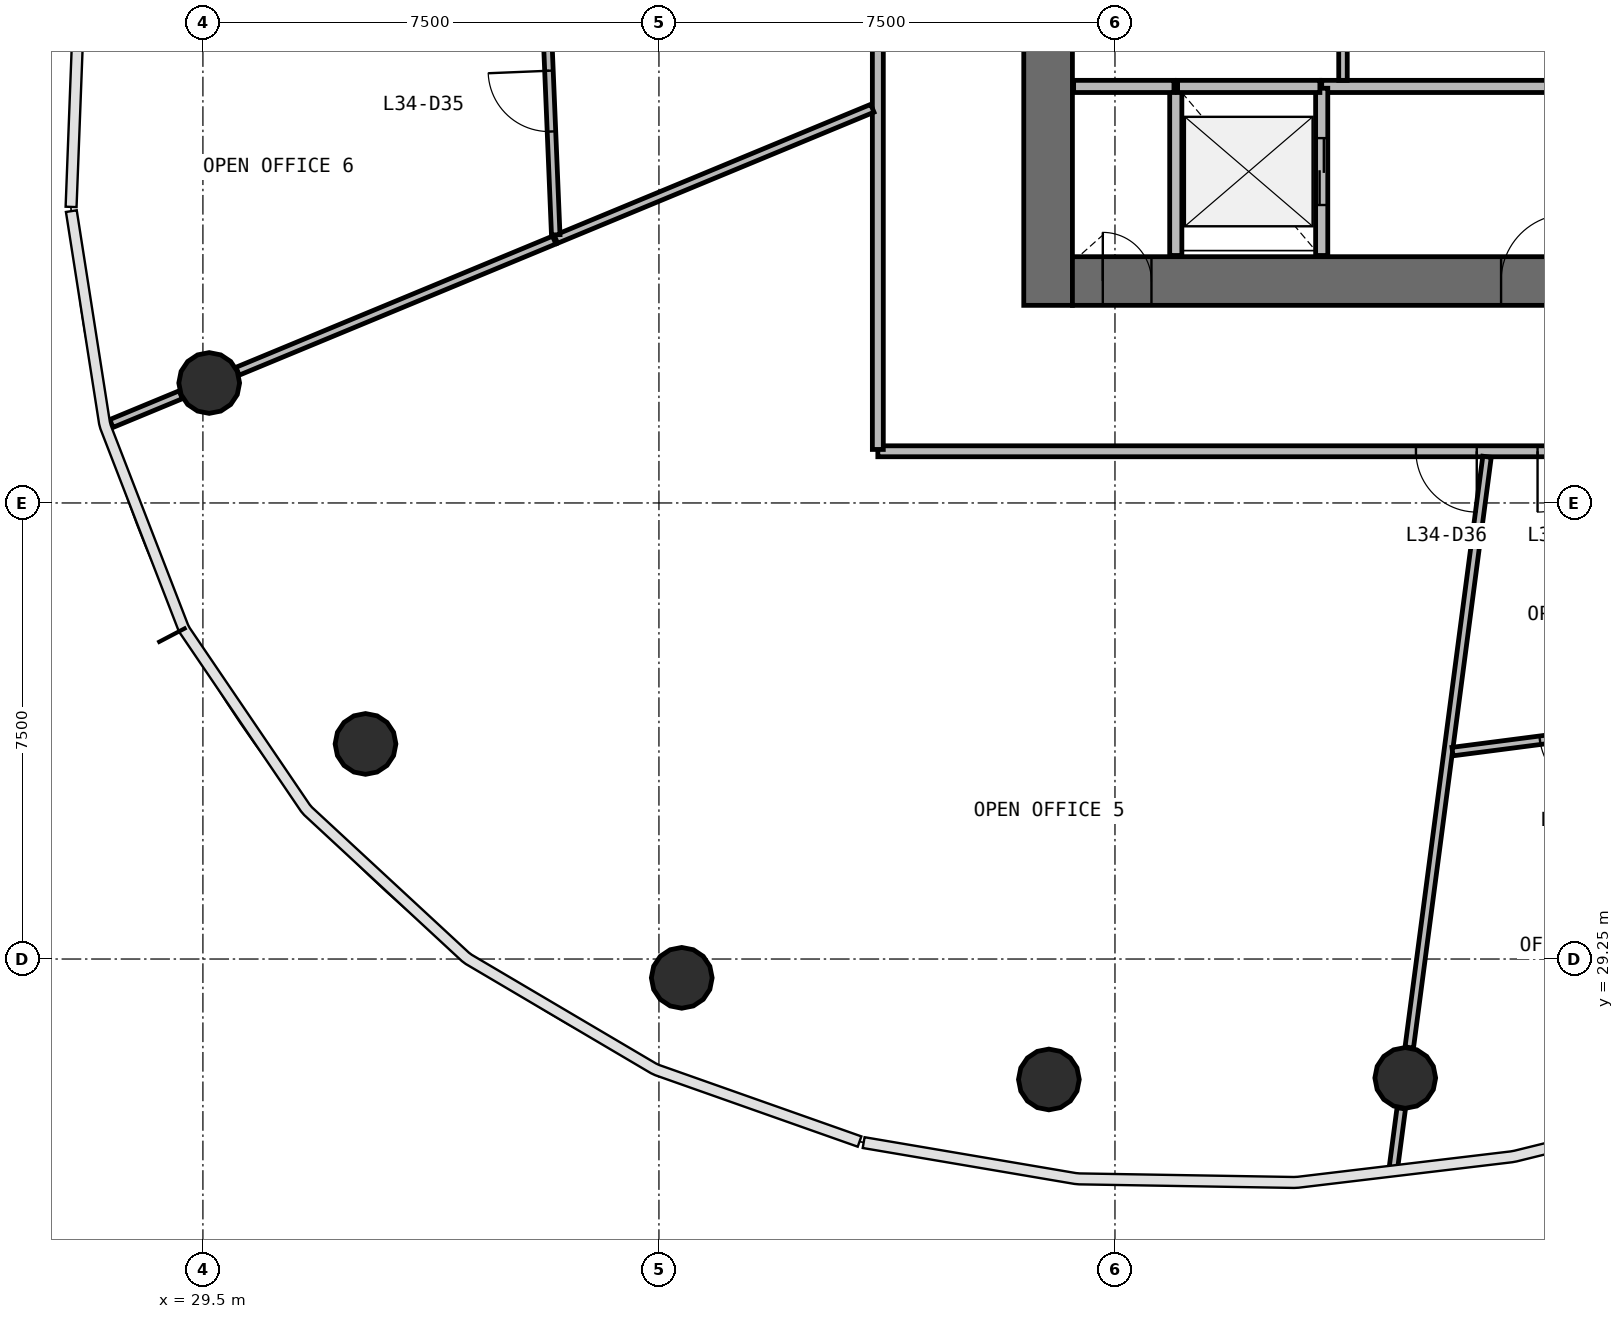
"""IFC4 building model, lengths in metres.
Left out: names, types, materials, properties, quantities, classifications, styles, units other than length and angle.
Written with IfcOpenShell. Run it as: python <this file> out.ifc"""

import sys

from ifc_helpers import new_model, si_unit, direction, frame, frame_2d, origin, origin_2d, place, context, subcontext, project, spatial, rectangle, circle, extrude, source, transform, mapped, element, fill, save


model = new_model("IFC4")
c1 = context("Model", 3, precision=1e-05, world=origin(), true_north=direction((0.0, 1.0)))
c2 = subcontext(c1, "Body", "Model", "MODEL_VIEW")
j1 = project(units=[si_unit("LENGTHUNIT", "METRE"), si_unit("PLANEANGLEUNIT", "RADIAN")], contexts=[c1])
p1 = place(None, origin())
s1 = spatial("IfcSite", under=j1, at=p1, CompositionType="ELEMENT")
p2 = place(p1, origin())
s2 = spatial("IfcBuilding", under=s1, at=p2, CompositionType="ELEMENT")
p3 = place(p2, frame((0.0, 0.0, 144.8)))
s3 = spatial("IfcBuildingStorey", under=s2, at=p3, CompositionType="ELEMENT", Elevation=144.8)
p4 = place(p3, frame((43.4, 56.0, 0.0), z_axis=(0.0, 0.0, 1.0), x_axis=(0.0, -1.0, 0.0)))
e1 = element("IfcWall", 1, at=p4, inside=s3, PredefinedType="SHEAR", context=c2, shape_type="SweptSolid", body=[
    extrude(rectangle(XDim=16.0, YDim=0.8, at=frame_2d((8.0, 0.0))), origin(), (0.0, 0.0, 1.0), 3.9),
])
p5 = place(p4, frame((7.1, 0.0, 0.0)))
e2 = element("IfcOpeningElement", 2, at=p5, cuts=e1, PredefinedType="OPENING", context=c2, shape_type="SweptSolid", body=[
    extrude(rectangle(XDim=1.8, YDim=2.1, at=frame_2d((0.9, 1.05))), frame((0.0, 0.41, 0.0), z_axis=(0.0, -1.0, 0.0), x_axis=(1.0, 0.0, 0.0)), (0.0, 0.0, 1.0), 0.82),
])
p6 = place(p3, frame((43.8, 40.4, 0.0), z_axis=(0.0, 0.0, 1.0), x_axis=(1.0, 0.0, 0.0)))
e3 = element("IfcWall", 3, at=p6, inside=s3, PredefinedType="SHEAR", context=c2, shape_type="SweptSolid", body=[
    extrude(rectangle(XDim=16.4, YDim=0.8, at=frame_2d((8.2, 0.0))), origin(), (0.0, 0.0, 1.0), 3.9),
])
p7 = place(p6, frame((10.1, 0.0, 0.0)))
e4 = element("IfcOpeningElement", 4, at=p7, cuts=e3, PredefinedType="OPENING", context=c2, shape_type="SweptSolid", body=[
    extrude(rectangle(XDim=1.2, YDim=2.1, at=frame_2d((0.6, 1.05))), frame((0.0, 0.41, 0.0), z_axis=(0.0, -1.0, 0.0), x_axis=(1.0, 0.0, 0.0)), (0.0, 0.0, 1.0), 0.82),
])
p8 = place(p6, frame((7.05, 0.0, 0.0)))
e5 = element("IfcOpeningElement", 5, at=p8, cuts=e3, PredefinedType="OPENING", context=c2, shape_type="SweptSolid", body=[
    extrude(rectangle(XDim=1.1, YDim=2.1, at=frame_2d((0.55, 1.05))), frame((0.0, 0.41, 0.0), z_axis=(0.0, -1.0, 0.0), x_axis=(1.0, 0.0, 0.0)), (0.0, 0.0, 1.0), 0.82),
])
p9 = place(p6, frame((0.5, 0.0, 0.0)))
e6 = element("IfcOpeningElement", 6, at=p9, cuts=e3, PredefinedType="OPENING", context=c2, shape_type="SweptSolid", body=[
    extrude(rectangle(XDim=0.8, YDim=2.1, at=frame_2d((0.4, 1.05))), frame((0.0, 0.41, 0.0), z_axis=(0.0, -1.0, 0.0), x_axis=(1.0, 0.0, 0.0)), (0.0, 0.0, 1.0), 0.82),
])
m1 = source(origin(), c2, "Body", "SweptSolid", [
    extrude(circle(Radius=0.5, at=origin_2d()), origin(), (0.0, 0.0, 1.0), 3.9),
])
for number, where, z_axis, x_axis in (
    (7, (29.603, 38.723, 0.0), (0.0, 0.0, 1.0), (1.0, 0.0, 0.0)),
    (8, (32.174, 32.787, 0.0), (0.0, 0.0, 1.0), (1.0, 0.0, 0.0)),
    (9, (37.375, 28.94, 0.0), (0.0, 0.0, 1.0), (1.0, 0.0, 0.0)),
    (10, (43.413, 27.269, 0.0), (0.0, 0.0, 1.0), (1.0, 0.0, 0.0)),
    (11, (49.274, 27.295, 0.0), (0.0, 0.0, 1.0), (1.0, 0.0, 0.0)),
):
    element("IfcColumn", number, at=place(p3, frame(where, z_axis=z_axis, x_axis=x_axis)), inside=s3, PredefinedType="COLUMN", context=c2, shape_type="MappedRepresentation", body=[
        mapped(m1, transform((0.0, 0.0, 0.0), scale=1.0)),
    ])
p10 = place(p3, frame((52.7, 43.6, 0.0), z_axis=(0.0, 0.0, 1.0), x_axis=(-1.0, 0.0, 0.0)))
e12 = element("IfcWall", 12, at=p10, inside=s3, PredefinedType="SOLIDWALL", context=c2, shape_type="SweptSolid", body=[
    extrude(rectangle(XDim=4.8, YDim=0.2, at=frame_2d((2.4, 0.0))), origin(), (0.0, 0.0, 1.0), 3.58),
])
p11 = place(p3, frame((45.5, 43.6, 0.0), z_axis=(0.0, 0.0, 1.0), x_axis=(0.0, -1.0, 0.0)))
e13 = element("IfcWall", 13, at=p11, inside=s3, PredefinedType="SOLIDWALL", context=c2, shape_type="SweptSolid", body=[
    extrude(rectangle(XDim=2.78, YDim=0.2, at=frame_2d((1.39, 0.0))), origin(), (0.0, 0.0, 1.0), 3.58),
])
p12 = place(p3, frame((47.9, 40.82, 0.0), z_axis=(0.0, 0.0, 1.0), x_axis=(0.0, 1.0, 0.0)))
e14 = element("IfcWall", 14, at=p12, inside=s3, PredefinedType="SOLIDWALL", context=c2, shape_type="SweptSolid", body=[
    extrude(rectangle(XDim=2.75, YDim=0.2, at=frame_2d((1.375, 0.0))), origin(), (0.0, 0.0, 1.0), 3.58),
])
p13 = place(p12, frame((0.83, 0.0, 0.0)))
e15 = element("IfcOpeningElement", 15, at=p13, cuts=e14, PredefinedType="OPENING", context=c2, shape_type="SweptSolid", body=[
    extrude(rectangle(XDim=1.1, YDim=2.1, at=frame_2d((0.55, 1.05))), frame((0.0, 0.11, 0.0), z_axis=(0.0, -1.0, 0.0), x_axis=(1.0, 0.0, 0.0)), (0.0, 0.0, 1.0), 0.22),
])
p14 = place(p3, frame((47.87, 43.6, 0.0), z_axis=(0.0, 0.0, 1.0), x_axis=(-1.0, 0.0, 0.0)))
e16 = element("IfcWall", 16, at=p14, inside=s3, PredefinedType="SOLIDWALL", context=c2, shape_type="SweptSolid", body=[
    extrude(rectangle(XDim=2.34, YDim=0.2, at=frame_2d((1.17, 0.0))), origin(), (0.0, 0.0, 1.0), 3.58),
])
p15 = place(p3, frame((45.47, 43.6, 0.0), z_axis=(0.0, 0.0, 1.0), x_axis=(-1.0, 0.0, 0.0)))
e17 = element("IfcWall", 17, at=p15, inside=s3, PredefinedType="SOLIDWALL", context=c2, shape_type="SweptSolid", body=[
    extrude(rectangle(XDim=1.65, YDim=0.2, at=frame_2d((0.825, 0.0))), origin(), (0.0, 0.0, 1.0), 3.58),
])
p16 = place(p3, frame((63.4, 37.6, 0.0), z_axis=(0.0, 0.0, 1.0), x_axis=(-1.0, 0.0, 0.0)))
e18 = element("IfcWall", 18, at=p16, inside=s3, PredefinedType="PARTITIONING", context=c2, shape_type="SweptSolid", body=[
    extrude(rectangle(XDim=22.8, YDim=0.18, at=frame_2d((11.4, 0.0))), origin(), (0.0, 0.0, 1.0), 2.88),
])
p17 = place(p16, frame((12.95, 0.0, 0.0)))
e19 = element("IfcOpeningElement", 19, at=p17, cuts=e18, PredefinedType="OPENING", context=c2, shape_type="SweptSolid", body=[
    extrude(rectangle(XDim=1.0, YDim=2.1, at=frame_2d((0.5, 1.05))), frame((0.0, 0.1, 0.0), z_axis=(0.0, -1.0, 0.0), x_axis=(1.0, 0.0, 0.0)), (0.0, 0.0, 1.0), 0.2),
])
p18 = place(p16, frame((10.95, 0.0, 0.0)))
e20 = element("IfcOpeningElement", 20, at=p18, cuts=e18, PredefinedType="OPENING", context=c2, shape_type="SweptSolid", body=[
    extrude(rectangle(XDim=1.0, YDim=2.1, at=frame_2d((0.5, 1.05))), frame((0.0, 0.1, 0.0), z_axis=(0.0, -1.0, 0.0), x_axis=(1.0, 0.0, 0.0)), (0.0, 0.0, 1.0), 0.2),
])
p19 = place(p3, frame((40.6, 37.63, 0.0), z_axis=(0.0, 0.0, 1.0), x_axis=(0.0, 1.0, 0.0)))
e21 = element("IfcWall", 21, at=p19, inside=s3, PredefinedType="PARTITIONING", context=c2, shape_type="SweptSolid", body=[
    extrude(rectangle(XDim=20.74, YDim=0.18, at=frame_2d((10.37, 0.0))), origin(), (0.0, 0.0, 1.0), 2.88),
])
p20 = place(p19, frame((9.89, 0.0, 0.0)))
e22 = element("IfcOpeningElement", 22, at=p20, cuts=e21, PredefinedType="OPENING", context=c2, shape_type="SweptSolid", body=[
    extrude(rectangle(XDim=1.0, YDim=2.1, at=frame_2d((0.5, 1.05))), frame((0.0, 0.1, 0.0), z_axis=(0.0, -1.0, 0.0), x_axis=(1.0, 0.0, 0.0)), (0.0, 0.0, 1.0), 0.2),
])
p21 = place(p3, frame((49.34, 27.795, 0.0), z_axis=(0.0, 0.0, 1.0), x_axis=(0.130529918789, 0.991444370755, 0.0)))
e23 = element("IfcWall", 23, at=p21, inside=s3, PredefinedType="PARTITIONING", context=c2, shape_type="SweptSolid", body=[
    extrude(rectangle(XDim=9.799, YDim=0.14, at=frame_2d((4.899, 0.0))), origin(), (0.0, 0.0, 1.0), 2.88),
])
p22 = place(p3, frame((40.51, 43.241, 0.0), z_axis=(0.0, 0.0, 1.0), x_axis=(-0.923876322458, -0.382691182028, 0.0)))
e24 = element("IfcWall", 24, at=p22, inside=s3, PredefinedType="PARTITIONING", context=c2, shape_type="SweptSolid", body=[
    extrude(rectangle(XDim=5.633, YDim=0.14, at=frame_2d((2.816, 0.0))), origin(), (0.0, 0.0, 1.0), 2.88),
])
p23 = place(p3, frame((35.278, 41.073, 0.0), z_axis=(0.0, 0.0, 1.0), x_axis=(-0.923885931512, -0.382667983445, 0.0)))
e25 = element("IfcWall", 25, at=p23, inside=s3, PredefinedType="PARTITIONING", context=c2, shape_type="SweptSolid", body=[
    extrude(rectangle(XDim=5.637, YDim=0.14, at=frame_2d((2.819, 0.0))), origin(), (0.0, 0.0, 1.0), 2.88),
])
p24 = place(p3, frame((35.302, 41.159, 0.0), z_axis=(0.0, 0.0, 1.0), x_axis=(-0.041309210476, 0.999146410257, 0.0)))
e26 = element("IfcWall", 26, at=p24, inside=s3, PredefinedType="PARTITIONING", context=c2, shape_type="SweptSolid", body=[
    extrude(rectangle(XDim=4.551, YDim=0.14, at=frame_2d((2.275, 0.0))), origin(), (0.0, 0.0, 1.0), 2.88),
])
p25 = place(p24, frame((1.701, 0.0, 0.0)))
e27 = element("IfcOpeningElement", 27, at=p25, cuts=e26, PredefinedType="OPENING", context=c2, shape_type="SweptSolid", body=[
    extrude(rectangle(XDim=1.0, YDim=2.1, at=frame_2d((0.5, 1.05))), frame((0.0, 0.08, 0.0), z_axis=(0.0, -1.0, 0.0), x_axis=(1.0, 0.0, 0.0)), (0.0, 0.0, 1.0), 0.16),
])
p26 = place(p3, frame((53.923, 33.163, 0.0), z_axis=(0.0, 0.0, 1.0), x_axis=(-0.991708853647, -0.128505056702, 0.0)))
e28 = element("IfcWall", 28, at=p26, inside=s3, PredefinedType="PARTITIONING", context=c2, shape_type="SweptSolid", body=[
    extrude(rectangle(XDim=3.904, YDim=0.14, at=frame_2d((1.952, 0.0))), origin(), (0.0, 0.0, 1.0), 2.88),
])
p27 = place(p26, frame((1.454, 0.0, 0.0)))
e29 = element("IfcOpeningElement", 29, at=p27, cuts=e28, PredefinedType="OPENING", context=c2, shape_type="SweptSolid", body=[
    extrude(rectangle(XDim=1.0, YDim=2.1, at=frame_2d((0.5, 1.05))), frame((0.0, 0.08, 0.0), z_axis=(0.0, -1.0, 0.0), x_axis=(1.0, 0.0, 0.0)), (0.0, 0.0, 1.0), 0.16),
])
p28 = place(p3, frame((48.25, 43.7, 0.0), z_axis=(0.0, 0.0, 1.0), x_axis=(0.0, 1.0, 0.0)))
e30 = element("IfcWall", 30, at=p28, inside=s3, PredefinedType="PARTITIONING", context=c2, shape_type="SweptSolid", body=[
    extrude(rectangle(XDim=2.29, YDim=0.14, at=frame_2d((1.145, 0.0))), origin(), (0.0, 0.0, 1.0), 2.88),
])
p29 = place(p3, frame((29.137, 38.53, 0.0), z_axis=(0.0, 0.0, 1.0), x_axis=(-0.923857958789, -0.382735511786, 0.0)))
e31 = element("IfcWall", 31, at=p29, inside=s3, PredefinedType="PARTITIONING", context=c2, shape_type="SweptSolid", body=[
    extrude(rectangle(XDim=1.236, YDim=0.14, at=frame_2d((0.618, 0.0))), origin(), (0.0, 0.0, 1.0), 2.88),
])
p30 = place(p3, frame((49.208, 26.795, 0.0), z_axis=(0.0, 0.0, 1.0), x_axis=(-0.130537967858, -0.991443311011, 0.0)))
e32 = element("IfcWall", 32, at=p30, inside=s3, PredefinedType="PARTITIONING", context=c2, shape_type="SweptSolid", body=[
    extrude(rectangle(XDim=0.984, YDim=0.14, at=frame_2d((0.492, 0.0))), origin(), (0.0, 0.0, 1.0), 2.88),
])
m2 = source(origin(), c2, "Body", "SweptSolid", [
    extrude(rectangle(XDim=1.1, YDim=2.1, at=frame_2d((0.55, 1.05))), frame((0.0, 0.025, 0.0), z_axis=(0.0, -1.0, 0.0), x_axis=(1.0, 0.0, 0.0)), (0.0, 0.0, 1.0), 0.05),
])
p31 = place(p13, origin())
e33 = element("IfcDoor", 33, at=p31, inside=s3, OperationType="DOUBLE_DOOR_SLIDING", PredefinedType="USERDEFINED", context=c2, shape_type="MappedRepresentation", body=[
    mapped(m2, transform((0.0, 0.0, 0.0), scale=1.0)),
])
fill(e15, e33)
m3 = source(origin(), c2, "Body", "SweptSolid", [
    extrude(rectangle(XDim=1.1, YDim=2.1, at=frame_2d((0.55, 1.05))), frame((0.0, 0.025, 0.0), z_axis=(0.0, -1.0, 0.0), x_axis=(1.0, 0.0, 0.0)), (0.0, 0.0, 1.0), 0.05),
])
p32 = place(p8, origin())
e34 = element("IfcDoor", 34, at=p32, inside=s3, OperationType="SINGLE_SWING_RIGHT", PredefinedType="DOOR", context=c2, shape_type="MappedRepresentation", body=[
    mapped(m3, transform((0.0, 0.0, 0.0), scale=1.0)),
])
fill(e5, e34)
m4 = source(origin(), c2, "Body", "SweptSolid", [
    extrude(rectangle(XDim=0.8, YDim=2.1, at=frame_2d((0.4, 1.05))), frame((0.0, 0.025, 0.0), z_axis=(0.0, -1.0, 0.0), x_axis=(1.0, 0.0, 0.0)), (0.0, 0.0, 1.0), 0.05),
])
p33 = place(p9, origin())
e35 = element("IfcDoor", 35, at=p33, inside=s3, OperationType="SINGLE_SWING_LEFT", PredefinedType="DOOR", context=c2, shape_type="MappedRepresentation", body=[
    mapped(m4, transform((0.0, 0.0, 0.0), scale=1.0)),
])
fill(e6, e35)
m5 = source(origin(), c2, "Body", "SweptSolid", [
    extrude(rectangle(XDim=1.0, YDim=2.1, at=frame_2d((0.5, 1.05))), frame((0.0, 0.025, 0.0), z_axis=(0.0, -1.0, 0.0), x_axis=(1.0, 0.0, 0.0)), (0.0, 0.0, 1.0), 0.05),
])
p34 = place(p25, origin())
e36 = element("IfcDoor", 36, at=p34, inside=s3, OperationType="SINGLE_SWING_RIGHT", PredefinedType="DOOR", context=c2, shape_type="MappedRepresentation", body=[
    mapped(m5, transform((0.0, 0.0, 0.0), scale=1.0)),
])
fill(e27, e36)
p35 = place(p17, origin())
e37 = element("IfcDoor", 37, at=p35, inside=s3, OperationType="SINGLE_SWING_LEFT", PredefinedType="DOOR", context=c2, shape_type="MappedRepresentation", body=[
    mapped(m5, transform((0.0, 0.0, 0.0), scale=1.0)),
])
fill(e19, e37)
p36 = place(p18, origin())
e38 = element("IfcDoor", 38, at=p36, inside=s3, OperationType="SINGLE_SWING_RIGHT", PredefinedType="DOOR", context=c2, shape_type="MappedRepresentation", body=[
    mapped(m5, transform((0.0, 0.0, 0.0), scale=1.0)),
])
fill(e20, e38)
p37 = place(p27, origin())
e39 = element("IfcDoor", 39, at=p37, inside=s3, OperationType="SINGLE_SWING_LEFT", PredefinedType="DOOR", context=c2, shape_type="MappedRepresentation", body=[
    mapped(m5, transform((0.0, 0.0, 0.0), scale=1.0)),
])
fill(e29, e39)
save(model, sys.argv[1])
